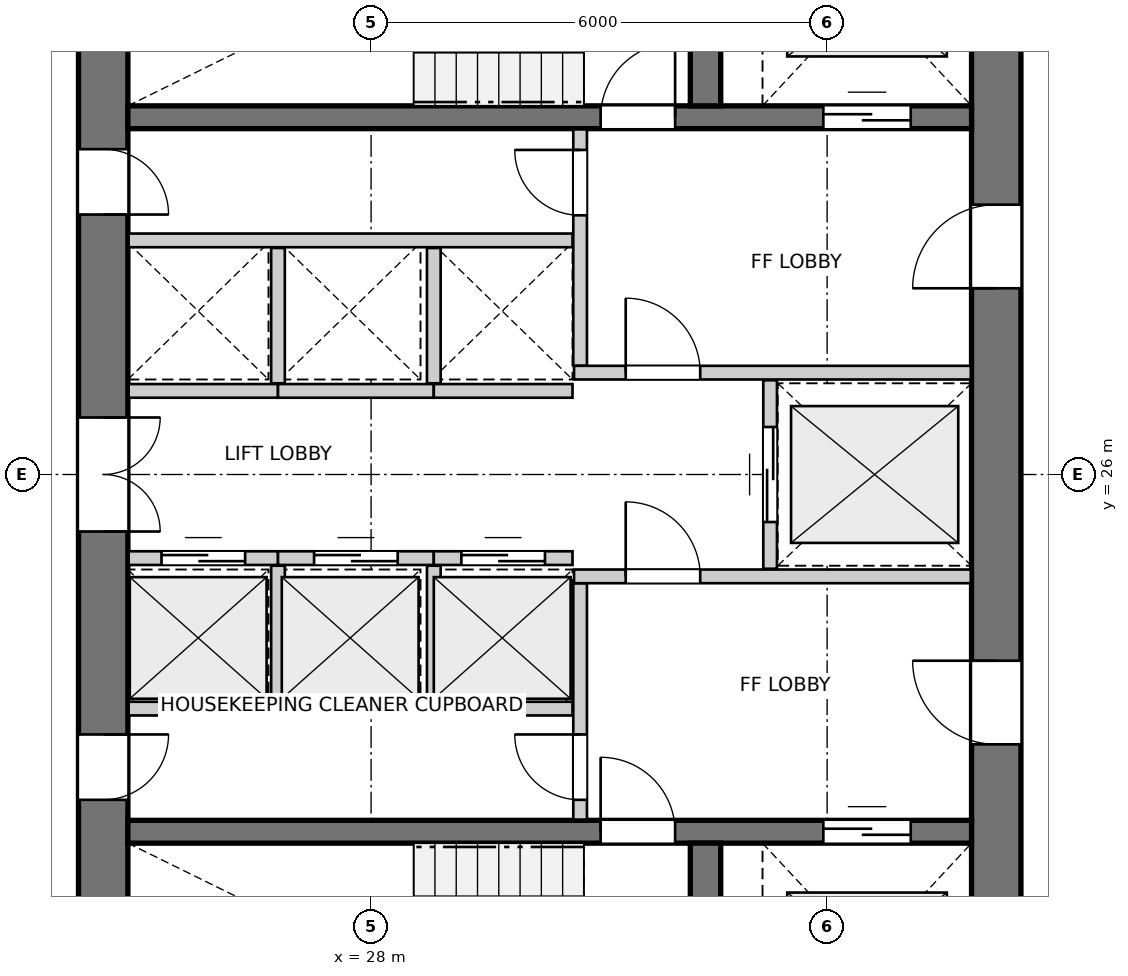
"""IFC4 building model, lengths in metres.
Left out: names, types, materials, properties, quantities, classifications, styles, units other than length and angle.
Written with IfcOpenShell. Run it as: python <this file> out.ifc"""

import sys

from ifc_helpers import new_model, si_unit, direction, frame, frame_2d, origin, place, context, subcontext, project, spatial, rectangle, extrude, source, transform, mapped, element, fill, save


model = new_model("IFC4")
c1 = context("Model", 3, precision=1e-05, world=origin(), true_north=direction((0.0, 1.0)))
c2 = subcontext(c1, "Body", "Model", "MODEL_VIEW")
j1 = project(units=[si_unit("LENGTHUNIT", "METRE"), si_unit("PLANEANGLEUNIT", "RADIAN")], contexts=[c1])
p1 = place(None, origin())
s1 = spatial("IfcSite", under=j1, at=p1, CompositionType="ELEMENT")
p2 = place(p1, origin())
s2 = spatial("IfcBuilding", under=s1, at=p2, CompositionType="ELEMENT")
p3 = place(p2, frame((0.0, 0.0, 70.4)))
s3 = spatial("IfcBuildingStorey", under=s2, at=p3, CompositionType="ELEMENT", Elevation=70.4)
p4 = place(p3, frame((24.475, 33.8, 0.0), z_axis=(0.0, 0.0, 1.0), x_axis=(0.0, -1.0, 0.0)))
e1 = element("IfcWall", 1, at=p4, inside=s3, PredefinedType="SHEAR", context=c2, shape_type="SweptSolid", body=[
    extrude(rectangle(XDim=15.6, YDim=0.65, at=frame_2d((7.8, 0.0))), origin(), (0.0, 0.0, 1.0), 2.95),
])
p5 = place(p4, frame((7.05, 0.0, 0.0)))
e2 = element("IfcOpeningElement", 2, at=p5, cuts=e1, PredefinedType="OPENING", context=c2, shape_type="SweptSolid", body=[
    extrude(rectangle(XDim=1.5, YDim=2.15, at=frame_2d((0.75, 1.075))), frame((0.0, 0.335, 0.0), z_axis=(0.0, -1.0, 0.0), x_axis=(1.0, 0.0, 0.0)), (0.0, 0.0, 1.0), 0.67),
])
p6 = place(p4, frame((3.52, 0.0, 0.0)))
e3 = element("IfcOpeningElement", 3, at=p6, cuts=e1, PredefinedType="OPENING", context=c2, shape_type="SweptSolid", body=[
    extrude(rectangle(XDim=0.86, YDim=2.05, at=frame_2d((0.43, 1.025))), frame((0.0, 0.335, 0.0), z_axis=(0.0, -1.0, 0.0), x_axis=(1.0, 0.0, 0.0)), (0.0, 0.0, 1.0), 0.67),
])
p7 = place(p4, frame((11.22, 0.0, 0.0)))
e4 = element("IfcOpeningElement", 4, at=p7, cuts=e1, PredefinedType="OPENING", context=c2, shape_type="SweptSolid", body=[
    extrude(rectangle(XDim=0.86, YDim=2.05, at=frame_2d((0.43, 1.025))), frame((0.0, 0.335, 0.0), z_axis=(0.0, -1.0, 0.0), x_axis=(1.0, 0.0, 0.0)), (0.0, 0.0, 1.0), 0.67),
])
p8 = place(p3, frame((36.225, 18.2, 0.0), z_axis=(0.0, 0.0, 1.0), x_axis=(0.0, 1.0, 0.0)))
e5 = element("IfcWall", 5, at=p8, inside=s3, PredefinedType="SHEAR", context=c2, shape_type="SweptSolid", body=[
    extrude(rectangle(XDim=15.6, YDim=0.65, at=frame_2d((7.8, 0.0))), origin(), (0.0, 0.0, 1.0), 2.95),
])
p9 = place(p8, frame((4.25, 0.0, 0.0)))
e6 = element("IfcOpeningElement", 6, at=p9, cuts=e5, PredefinedType="OPENING", context=c2, shape_type="SweptSolid", body=[
    extrude(rectangle(XDim=1.1, YDim=2.15, at=frame_2d((0.55, 1.075))), frame((0.0, 0.335, 0.0), z_axis=(0.0, -1.0, 0.0), x_axis=(1.0, 0.0, 0.0)), (0.0, 0.0, 1.0), 0.67),
])
p10 = place(p8, frame((10.25, 0.0, 0.0)))
e7 = element("IfcOpeningElement", 7, at=p10, cuts=e5, PredefinedType="OPENING", context=c2, shape_type="SweptSolid", body=[
    extrude(rectangle(XDim=1.1, YDim=2.15, at=frame_2d((0.55, 1.075))), frame((0.0, 0.335, 0.0), z_axis=(0.0, -1.0, 0.0), x_axis=(1.0, 0.0, 0.0)), (0.0, 0.0, 1.0), 0.67),
])
p11 = place(p3, frame((24.8, 21.3, 0.0), z_axis=(0.0, 0.0, 1.0), x_axis=(1.0, 0.0, 0.0)))
e8 = element("IfcWall", 8, at=p11, inside=s3, PredefinedType="SHEAR", context=c2, shape_type="SweptSolid", body=[
    extrude(rectangle(XDim=11.1, YDim=0.3, at=frame_2d((5.55, 0.0))), origin(), (0.0, 0.0, 1.0), 2.95),
])
p12 = place(p11, frame((6.22, 0.0, 0.0)))
e9 = element("IfcOpeningElement", 9, at=p12, cuts=e8, PredefinedType="OPENING", context=c2, shape_type="SweptSolid", body=[
    extrude(rectangle(XDim=0.98, YDim=2.15, at=frame_2d((0.49, 1.075))), frame((0.0, 0.16, 0.0), z_axis=(0.0, -1.0, 0.0), x_axis=(1.0, 0.0, 0.0)), (0.0, 0.0, 1.0), 0.32),
])
p13 = place(p11, frame((9.15, 0.0, 0.0)))
e10 = element("IfcOpeningElement", 10, at=p13, cuts=e8, PredefinedType="OPENING", context=c2, shape_type="SweptSolid", body=[
    extrude(rectangle(XDim=1.15, YDim=2.15, at=frame_2d((0.575, 1.075))), frame((0.0, 0.16, 0.0), z_axis=(0.0, -1.0, 0.0), x_axis=(1.0, 0.0, 0.0)), (0.0, 0.0, 1.0), 0.32),
])
p14 = place(p3, frame((32.4, 18.2, 0.0), z_axis=(0.0, 0.0, 1.0), x_axis=(0.0, 1.0, 0.0)))
e11 = element("IfcWall", 11, at=p14, inside=s3, PredefinedType="SHEAR", context=c2, shape_type="SweptSolid", body=[
    extrude(rectangle(XDim=2.95, YDim=0.4, at=frame_2d((1.475, 0.0))), origin(), (0.0, 0.0, 1.0), 2.95),
])
p15 = place(p3, frame((24.8, 30.7, 0.0), z_axis=(0.0, 0.0, 1.0), x_axis=(1.0, 0.0, 0.0)))
e12 = element("IfcWall", 12, at=p15, inside=s3, PredefinedType="SHEAR", context=c2, shape_type="SweptSolid", body=[
    extrude(rectangle(XDim=11.1, YDim=0.3, at=frame_2d((5.55, 0.0))), origin(), (0.0, 0.0, 1.0), 2.95),
])
p16 = place(p15, frame((6.22, 0.0, 0.0)))
e13 = element("IfcOpeningElement", 13, at=p16, cuts=e12, PredefinedType="OPENING", context=c2, shape_type="SweptSolid", body=[
    extrude(rectangle(XDim=0.98, YDim=2.15, at=frame_2d((0.49, 1.075))), frame((0.0, 0.16, 0.0), z_axis=(0.0, -1.0, 0.0), x_axis=(1.0, 0.0, 0.0)), (0.0, 0.0, 1.0), 0.32),
])
p17 = place(p15, frame((9.15, 0.0, 0.0)))
e14 = element("IfcOpeningElement", 14, at=p17, cuts=e12, PredefinedType="OPENING", context=c2, shape_type="SweptSolid", body=[
    extrude(rectangle(XDim=1.15, YDim=2.15, at=frame_2d((0.575, 1.075))), frame((0.0, 0.16, 0.0), z_axis=(0.0, -1.0, 0.0), x_axis=(1.0, 0.0, 0.0)), (0.0, 0.0, 1.0), 0.32),
])
p18 = place(p3, frame((32.4, 30.85, 0.0), z_axis=(0.0, 0.0, 1.0), x_axis=(0.0, 1.0, 0.0)))
e15 = element("IfcWall", 15, at=p18, inside=s3, PredefinedType="SHEAR", context=c2, shape_type="SweptSolid", body=[
    extrude(rectangle(XDim=2.95, YDim=0.4, at=frame_2d((1.475, 0.0))), origin(), (0.0, 0.0, 1.0), 2.95),
])
p19 = place(p3, frame((30.75, 21.46, 0.0), z_axis=(0.0, 0.0, 1.0), x_axis=(0.0, 1.0, 0.0)))
e16 = element("IfcWall", 16, at=p19, inside=s3, PredefinedType="PARTITIONING", context=c2, shape_type="SweptSolid", body=[
    extrude(rectangle(XDim=3.11, YDim=0.18, at=frame_2d((1.555, 0.0))), origin(), (0.0, 0.0, 1.0), 2.95),
])
p20 = place(p19, frame((0.26, 0.0, 0.0)))
e17 = element("IfcOpeningElement", 17, at=p20, cuts=e16, PredefinedType="OPENING", context=c2, shape_type="SweptSolid", body=[
    extrude(rectangle(XDim=0.86, YDim=2.05, at=frame_2d((0.43, 1.025))), frame((0.0, 0.1, 0.0), z_axis=(0.0, -1.0, 0.0), x_axis=(1.0, 0.0, 0.0)), (0.0, 0.0, 1.0), 0.2),
])
p21 = place(p3, frame((30.67, 24.66, 0.0), z_axis=(0.0, 0.0, 1.0), x_axis=(1.0, 0.0, 0.0)))
e18 = element("IfcWall", 18, at=p21, inside=s3, PredefinedType="PARTITIONING", context=c2, shape_type="SweptSolid", body=[
    extrude(rectangle(XDim=5.22, YDim=0.18, at=frame_2d((2.61, 0.0))), origin(), (0.0, 0.0, 1.0), 2.95),
])
p22 = place(p21, frame((0.68, 0.0, 0.0)))
e19 = element("IfcOpeningElement", 19, at=p22, cuts=e18, PredefinedType="OPENING", context=c2, shape_type="SweptSolid", body=[
    extrude(rectangle(XDim=0.98, YDim=2.15, at=frame_2d((0.49, 1.075))), frame((0.0, 0.1, 0.0), z_axis=(0.0, -1.0, 0.0), x_axis=(1.0, 0.0, 0.0)), (0.0, 0.0, 1.0), 0.2),
])
p23 = place(p3, frame((30.75, 27.43, 0.0), z_axis=(0.0, 0.0, 1.0), x_axis=(0.0, 1.0, 0.0)))
e20 = element("IfcWall", 20, at=p23, inside=s3, PredefinedType="PARTITIONING", context=c2, shape_type="SweptSolid", body=[
    extrude(rectangle(XDim=3.11, YDim=0.18, at=frame_2d((1.555, 0.0))), origin(), (0.0, 0.0, 1.0), 2.95),
])
p24 = place(p23, frame((1.98, 0.0, 0.0)))
e21 = element("IfcOpeningElement", 21, at=p24, cuts=e20, PredefinedType="OPENING", context=c2, shape_type="SweptSolid", body=[
    extrude(rectangle(XDim=0.86, YDim=2.05, at=frame_2d((0.43, 1.025))), frame((0.0, 0.1, 0.0), z_axis=(0.0, -1.0, 0.0), x_axis=(1.0, 0.0, 0.0)), (0.0, 0.0, 1.0), 0.2),
])
p25 = place(p3, frame((30.67, 27.34, 0.0), z_axis=(0.0, 0.0, 1.0), x_axis=(1.0, 0.0, 0.0)))
e22 = element("IfcWall", 22, at=p25, inside=s3, PredefinedType="PARTITIONING", context=c2, shape_type="SweptSolid", body=[
    extrude(rectangle(XDim=5.22, YDim=0.18, at=frame_2d((2.61, 0.0))), origin(), (0.0, 0.0, 1.0), 2.95),
])
p26 = place(p25, frame((0.68, 0.0, 0.0)))
e23 = element("IfcOpeningElement", 23, at=p26, cuts=e22, PredefinedType="OPENING", context=c2, shape_type="SweptSolid", body=[
    extrude(rectangle(XDim=0.98, YDim=2.15, at=frame_2d((0.49, 1.075))), frame((0.0, 0.1, 0.0), z_axis=(0.0, -1.0, 0.0), x_axis=(1.0, 0.0, 0.0)), (0.0, 0.0, 1.0), 0.2),
])
p27 = place(p3, frame((33.25, 24.76, 0.0), z_axis=(0.0, 0.0, 1.0), x_axis=(0.0, 1.0, 0.0)))
e24 = element("IfcWall", 24, at=p27, inside=s3, PredefinedType="PARTITIONING", context=c2, shape_type="SweptSolid", body=[
    extrude(rectangle(XDim=2.48, YDim=0.18, at=frame_2d((1.24, 0.0))), origin(), (0.0, 0.0, 1.0), 2.95),
])
p28 = place(p27, frame((0.615, 0.0, 0.0)))
e25 = element("IfcOpeningElement", 25, at=p28, cuts=e24, PredefinedType="OPENING", context=c2, shape_type="SweptSolid", body=[
    extrude(rectangle(XDim=1.25, YDim=2.15, at=frame_2d((0.625, 1.075))), frame((0.0, 0.1, 0.0), z_axis=(0.0, -1.0, 0.0), x_axis=(1.0, 0.0, 0.0)), (0.0, 0.0, 1.0), 0.2),
])
p29 = place(p3, frame((24.81, 22.92, 0.0), z_axis=(0.0, 0.0, 1.0), x_axis=(1.0, 0.0, 0.0)))
e26 = element("IfcWall", 26, at=p29, inside=s3, PredefinedType="PARTITIONING", context=c2, shape_type="SweptSolid", body=[
    extrude(rectangle(XDim=5.84, YDim=0.18, at=frame_2d((2.92, 0.0))), origin(), (0.0, 0.0, 1.0), 2.95),
])
p30 = place(p3, frame((24.81, 24.9, 0.0), z_axis=(0.0, 0.0, 1.0), x_axis=(1.0, 0.0, 0.0)))
e27 = element("IfcWall", 27, at=p30, inside=s3, PredefinedType="PARTITIONING", context=c2, shape_type="SweptSolid", body=[
    extrude(rectangle(XDim=1.965, YDim=0.18, at=frame_2d((0.982, 0.0))), origin(), (0.0, 0.0, 1.0), 2.95),
])
p31 = place(p30, frame((0.433, 0.0, 0.0)))
e28 = element("IfcOpeningElement", 28, at=p31, cuts=e27, PredefinedType="OPENING", context=c2, shape_type="SweptSolid", body=[
    extrude(rectangle(XDim=1.1, YDim=2.15, at=frame_2d((0.55, 1.075))), frame((0.0, 0.1, 0.0), z_axis=(0.0, -1.0, 0.0), x_axis=(1.0, 0.0, 0.0)), (0.0, 0.0, 1.0), 0.2),
])
p32 = place(p3, frame((26.775, 24.9, 0.0), z_axis=(0.0, 0.0, 1.0), x_axis=(1.0, 0.0, 0.0)))
e29 = element("IfcWall", 29, at=p32, inside=s3, PredefinedType="PARTITIONING", context=c2, shape_type="SweptSolid", body=[
    extrude(rectangle(XDim=2.05, YDim=0.18, at=frame_2d((1.025, 0.0))), origin(), (0.0, 0.0, 1.0), 2.95),
])
p33 = place(p32, frame((0.475, 0.0, 0.0)))
e30 = element("IfcOpeningElement", 30, at=p33, cuts=e29, PredefinedType="OPENING", context=c2, shape_type="SweptSolid", body=[
    extrude(rectangle(XDim=1.1, YDim=2.15, at=frame_2d((0.55, 1.075))), frame((0.0, 0.1, 0.0), z_axis=(0.0, -1.0, 0.0), x_axis=(1.0, 0.0, 0.0)), (0.0, 0.0, 1.0), 0.2),
])
p34 = place(p3, frame((26.775, 23.02, 0.0), z_axis=(0.0, 0.0, 1.0), x_axis=(0.0, 1.0, 0.0)))
e31 = element("IfcWall", 31, at=p34, inside=s3, PredefinedType="PARTITIONING", context=c2, shape_type="SweptSolid", body=[
    extrude(rectangle(XDim=1.78, YDim=0.18, at=frame_2d((0.89, 0.0))), origin(), (0.0, 0.0, 1.0), 2.95),
])
p35 = place(p3, frame((28.825, 24.9, 0.0), z_axis=(0.0, 0.0, 1.0), x_axis=(1.0, 0.0, 0.0)))
e32 = element("IfcWall", 32, at=p35, inside=s3, PredefinedType="PARTITIONING", context=c2, shape_type="SweptSolid", body=[
    extrude(rectangle(XDim=1.825, YDim=0.18, at=frame_2d((0.913, 0.0))), origin(), (0.0, 0.0, 1.0), 2.95),
])
p36 = place(p35, frame((0.363, 0.0, 0.0)))
e33 = element("IfcOpeningElement", 33, at=p36, cuts=e32, PredefinedType="OPENING", context=c2, shape_type="SweptSolid", body=[
    extrude(rectangle(XDim=1.1, YDim=2.15, at=frame_2d((0.55, 1.075))), frame((0.0, 0.1, 0.0), z_axis=(0.0, -1.0, 0.0), x_axis=(1.0, 0.0, 0.0)), (0.0, 0.0, 1.0), 0.2),
])
p37 = place(p3, frame((28.825, 23.02, 0.0), z_axis=(0.0, 0.0, 1.0), x_axis=(0.0, 1.0, 0.0)))
e34 = element("IfcWall", 34, at=p37, inside=s3, PredefinedType="PARTITIONING", context=c2, shape_type="SweptSolid", body=[
    extrude(rectangle(XDim=1.78, YDim=0.18, at=frame_2d((0.89, 0.0))), origin(), (0.0, 0.0, 1.0), 2.95),
])
p38 = place(p3, frame((24.81, 29.08, 0.0), z_axis=(0.0, 0.0, 1.0), x_axis=(1.0, 0.0, 0.0)))
e35 = element("IfcWall", 35, at=p38, inside=s3, PredefinedType="PARTITIONING", context=c2, shape_type="SweptSolid", body=[
    extrude(rectangle(XDim=5.84, YDim=0.18, at=frame_2d((2.92, 0.0))), origin(), (0.0, 0.0, 1.0), 2.95),
])
p39 = place(p3, frame((24.81, 27.1, 0.0), z_axis=(0.0, 0.0, 1.0), x_axis=(1.0, 0.0, 0.0)))
e36 = element("IfcWall", 36, at=p39, inside=s3, PredefinedType="PARTITIONING", context=c2, shape_type="SweptSolid", body=[
    extrude(rectangle(XDim=1.965, YDim=0.18, at=frame_2d((0.982, 0.0))), origin(), (0.0, 0.0, 1.0), 2.95),
])
p40 = place(p3, frame((26.775, 27.1, 0.0), z_axis=(0.0, 0.0, 1.0), x_axis=(1.0, 0.0, 0.0)))
e37 = element("IfcWall", 37, at=p40, inside=s3, PredefinedType="PARTITIONING", context=c2, shape_type="SweptSolid", body=[
    extrude(rectangle(XDim=2.05, YDim=0.18, at=frame_2d((1.025, 0.0))), origin(), (0.0, 0.0, 1.0), 2.95),
])
p41 = place(p3, frame((26.775, 27.2, 0.0), z_axis=(0.0, 0.0, 1.0), x_axis=(0.0, 1.0, 0.0)))
e38 = element("IfcWall", 38, at=p41, inside=s3, PredefinedType="PARTITIONING", context=c2, shape_type="SweptSolid", body=[
    extrude(rectangle(XDim=1.78, YDim=0.18, at=frame_2d((0.89, 0.0))), origin(), (0.0, 0.0, 1.0), 2.95),
])
p42 = place(p3, frame((28.825, 27.1, 0.0), z_axis=(0.0, 0.0, 1.0), x_axis=(1.0, 0.0, 0.0)))
e39 = element("IfcWall", 39, at=p42, inside=s3, PredefinedType="PARTITIONING", context=c2, shape_type="SweptSolid", body=[
    extrude(rectangle(XDim=1.825, YDim=0.18, at=frame_2d((0.913, 0.0))), origin(), (0.0, 0.0, 1.0), 2.95),
])
p43 = place(p3, frame((28.825, 27.2, 0.0), z_axis=(0.0, 0.0, 1.0), x_axis=(0.0, 1.0, 0.0)))
e40 = element("IfcWall", 40, at=p43, inside=s3, PredefinedType="PARTITIONING", context=c2, shape_type="SweptSolid", body=[
    extrude(rectangle(XDim=1.78, YDim=0.18, at=frame_2d((0.89, 0.0))), origin(), (0.0, 0.0, 1.0), 2.95),
])
m1 = source(origin(), c2, "Body", "SweptSolid", [
    extrude(rectangle(XDim=0.98, YDim=2.15, at=frame_2d((0.49, 1.075))), frame((0.0, 0.025, 0.0), z_axis=(0.0, -1.0, 0.0), x_axis=(1.0, 0.0, 0.0)), (0.0, 0.0, 1.0), 0.05),
])
p44 = place(p12, origin())
e41 = element("IfcDoor", 41, at=p44, inside=s3, OperationType="SINGLE_SWING_LEFT", PredefinedType="DOOR", context=c2, shape_type="MappedRepresentation", body=[
    mapped(m1, transform((0.0, 0.0, 0.0), x_axis=(1.0, 0.0, 0.0), y_axis=(0.0, 1.0, 0.0), z_axis=(0.0, 0.0, 1.0), scale=1.0)),
])
fill(e9, e41)
m2 = source(origin(), c2, "Body", "SweptSolid", [
    extrude(rectangle(XDim=1.15, YDim=2.15, at=frame_2d((0.575, 1.075))), frame((0.0, 0.025, 0.0), z_axis=(0.0, -1.0, 0.0), x_axis=(1.0, 0.0, 0.0)), (0.0, 0.0, 1.0), 0.05),
])
p45 = place(p13, origin())
e42 = element("IfcDoor", 42, at=p45, inside=s3, OperationType="DOUBLE_DOOR_SLIDING", PredefinedType="DOOR", context=c2, shape_type="MappedRepresentation", body=[
    mapped(m2, transform((0.0, 0.0, 0.0), x_axis=(1.0, 0.0, 0.0), y_axis=(0.0, 1.0, 0.0), z_axis=(0.0, 0.0, 1.0), scale=1.0)),
])
fill(e10, e42)
p46 = place(p16, origin())
e43 = element("IfcDoor", 43, at=p46, inside=s3, OperationType="SINGLE_SWING_RIGHT", PredefinedType="DOOR", context=c2, shape_type="MappedRepresentation", body=[
    mapped(m1, transform((0.0, 0.0, 0.0), x_axis=(1.0, 0.0, 0.0), y_axis=(0.0, 1.0, 0.0), z_axis=(0.0, 0.0, 1.0), scale=1.0)),
])
fill(e13, e43)
p47 = place(p17, origin())
e44 = element("IfcDoor", 44, at=p47, inside=s3, OperationType="DOUBLE_DOOR_SLIDING", PredefinedType="DOOR", context=c2, shape_type="MappedRepresentation", body=[
    mapped(m2, transform((0.0, 0.0, 0.0), x_axis=(1.0, 0.0, 0.0), y_axis=(0.0, 1.0, 0.0), z_axis=(0.0, 0.0, 1.0), scale=1.0)),
])
fill(e14, e44)
m3 = source(origin(), c2, "Body", "SweptSolid", [
    extrude(rectangle(XDim=1.1, YDim=2.15, at=frame_2d((0.55, 1.075))), frame((0.0, 0.025, 0.0), z_axis=(0.0, -1.0, 0.0), x_axis=(1.0, 0.0, 0.0)), (0.0, 0.0, 1.0), 0.05),
])
p48 = place(p9, origin())
e45 = element("IfcDoor", 45, at=p48, inside=s3, OperationType="SINGLE_SWING_RIGHT", PredefinedType="DOOR", context=c2, shape_type="MappedRepresentation", body=[
    mapped(m3, transform((0.0, 0.0, 0.0), x_axis=(1.0, 0.0, 0.0), y_axis=(0.0, 1.0, 0.0), z_axis=(0.0, 0.0, 1.0), scale=1.0)),
])
fill(e6, e45)
p49 = place(p10, origin())
e46 = element("IfcDoor", 46, at=p49, inside=s3, OperationType="SINGLE_SWING_LEFT", PredefinedType="DOOR", context=c2, shape_type="MappedRepresentation", body=[
    mapped(m3, transform((0.0, 0.0, 0.0), x_axis=(1.0, 0.0, 0.0), y_axis=(0.0, 1.0, 0.0), z_axis=(0.0, 0.0, 1.0), scale=1.0)),
])
fill(e7, e46)
m4 = source(origin(), c2, "Body", "SweptSolid", [
    extrude(rectangle(XDim=1.5, YDim=2.15, at=frame_2d((0.75, 1.075))), frame((0.0, 0.025, 0.0), z_axis=(0.0, -1.0, 0.0), x_axis=(1.0, 0.0, 0.0)), (0.0, 0.0, 1.0), 0.05),
])
p50 = place(p5, origin())
e47 = element("IfcDoor", 47, at=p50, inside=s3, OperationType="DOUBLE_DOOR_SINGLE_SWING", PredefinedType="DOOR", context=c2, shape_type="MappedRepresentation", body=[
    mapped(m4, transform((0.0, 0.0, 0.0), x_axis=(1.0, 0.0, 0.0), y_axis=(0.0, 1.0, 0.0), z_axis=(0.0, 0.0, 1.0), scale=1.0)),
])
fill(e2, e47)
m5 = source(origin(), c2, "Body", "SweptSolid", [
    extrude(rectangle(XDim=0.86, YDim=2.05, at=frame_2d((0.43, 1.025))), frame((0.0, 0.025, 0.0), z_axis=(0.0, -1.0, 0.0), x_axis=(1.0, 0.0, 0.0)), (0.0, 0.0, 1.0), 0.05),
])
p51 = place(p6, origin())
e48 = element("IfcDoor", 48, at=p51, inside=s3, OperationType="SINGLE_SWING_RIGHT", PredefinedType="DOOR", context=c2, shape_type="MappedRepresentation", body=[
    mapped(m5, transform((0.0, 0.0, 0.0), x_axis=(1.0, 0.0, 0.0), y_axis=(0.0, 1.0, 0.0), z_axis=(0.0, 0.0, 1.0), scale=1.0)),
])
fill(e3, e48)
p52 = place(p7, origin())
e49 = element("IfcDoor", 49, at=p52, inside=s3, OperationType="SINGLE_SWING_LEFT", PredefinedType="DOOR", context=c2, shape_type="MappedRepresentation", body=[
    mapped(m5, transform((0.0, 0.0, 0.0), x_axis=(1.0, 0.0, 0.0), y_axis=(0.0, 1.0, 0.0), z_axis=(0.0, 0.0, 1.0), scale=1.0)),
])
fill(e4, e49)
p53 = place(p20, origin())
e50 = element("IfcDoor", 50, at=p53, inside=s3, OperationType="SINGLE_SWING_RIGHT", PredefinedType="DOOR", context=c2, shape_type="MappedRepresentation", body=[
    mapped(m5, transform((0.0, 0.0, 0.0), x_axis=(1.0, 0.0, 0.0), y_axis=(0.0, 1.0, 0.0), z_axis=(0.0, 0.0, 1.0), scale=1.0)),
])
fill(e17, e50)
p54 = place(p22, origin())
e51 = element("IfcDoor", 51, at=p54, inside=s3, OperationType="SINGLE_SWING_LEFT", PredefinedType="DOOR", context=c2, shape_type="MappedRepresentation", body=[
    mapped(m1, transform((0.0, 0.0, 0.0), x_axis=(1.0, 0.0, 0.0), y_axis=(0.0, 1.0, 0.0), z_axis=(0.0, 0.0, 1.0), scale=1.0)),
])
fill(e19, e51)
p55 = place(p24, origin())
e52 = element("IfcDoor", 52, at=p55, inside=s3, OperationType="SINGLE_SWING_RIGHT", PredefinedType="DOOR", context=c2, shape_type="MappedRepresentation", body=[
    mapped(m5, transform((0.0, 0.0, 0.0), x_axis=(1.0, 0.0, 0.0), y_axis=(0.0, 1.0, 0.0), z_axis=(0.0, 0.0, 1.0), scale=1.0)),
])
fill(e21, e52)
p56 = place(p26, origin())
e53 = element("IfcDoor", 53, at=p56, inside=s3, OperationType="SINGLE_SWING_LEFT", PredefinedType="DOOR", context=c2, shape_type="MappedRepresentation", body=[
    mapped(m1, transform((0.0, 0.0, 0.0), x_axis=(1.0, 0.0, 0.0), y_axis=(0.0, 1.0, 0.0), z_axis=(0.0, 0.0, 1.0), scale=1.0)),
])
fill(e23, e53)
m6 = source(origin(), c2, "Body", "SweptSolid", [
    extrude(rectangle(XDim=1.25, YDim=2.15, at=frame_2d((0.625, 1.075))), frame((0.0, 0.025, 0.0), z_axis=(0.0, -1.0, 0.0), x_axis=(1.0, 0.0, 0.0)), (0.0, 0.0, 1.0), 0.05),
])
p57 = place(p28, origin())
e54 = element("IfcDoor", 54, at=p57, inside=s3, OperationType="DOUBLE_DOOR_SLIDING", PredefinedType="DOOR", context=c2, shape_type="MappedRepresentation", body=[
    mapped(m6, transform((0.0, 0.0, 0.0), x_axis=(1.0, 0.0, 0.0), y_axis=(0.0, 1.0, 0.0), z_axis=(0.0, 0.0, 1.0), scale=1.0)),
])
fill(e25, e54)
p58 = place(p31, origin())
e55 = element("IfcDoor", 55, at=p58, inside=s3, OperationType="DOUBLE_DOOR_SLIDING", PredefinedType="DOOR", context=c2, shape_type="MappedRepresentation", body=[
    mapped(m3, transform((0.0, 0.0, 0.0), x_axis=(1.0, 0.0, 0.0), y_axis=(0.0, 1.0, 0.0), z_axis=(0.0, 0.0, 1.0), scale=1.0)),
])
fill(e28, e55)
p59 = place(p33, origin())
e56 = element("IfcDoor", 56, at=p59, inside=s3, OperationType="DOUBLE_DOOR_SLIDING", PredefinedType="DOOR", context=c2, shape_type="MappedRepresentation", body=[
    mapped(m3, transform((0.0, 0.0, 0.0), x_axis=(1.0, 0.0, 0.0), y_axis=(0.0, 1.0, 0.0), z_axis=(0.0, 0.0, 1.0), scale=1.0)),
])
fill(e30, e56)
p60 = place(p36, origin())
e57 = element("IfcDoor", 57, at=p60, inside=s3, OperationType="DOUBLE_DOOR_SLIDING", PredefinedType="DOOR", context=c2, shape_type="MappedRepresentation", body=[
    mapped(m3, transform((0.0, 0.0, 0.0), x_axis=(1.0, 0.0, 0.0), y_axis=(0.0, 1.0, 0.0), z_axis=(0.0, 0.0, 1.0), scale=1.0)),
])
fill(e33, e57)
save(model, sys.argv[1])
